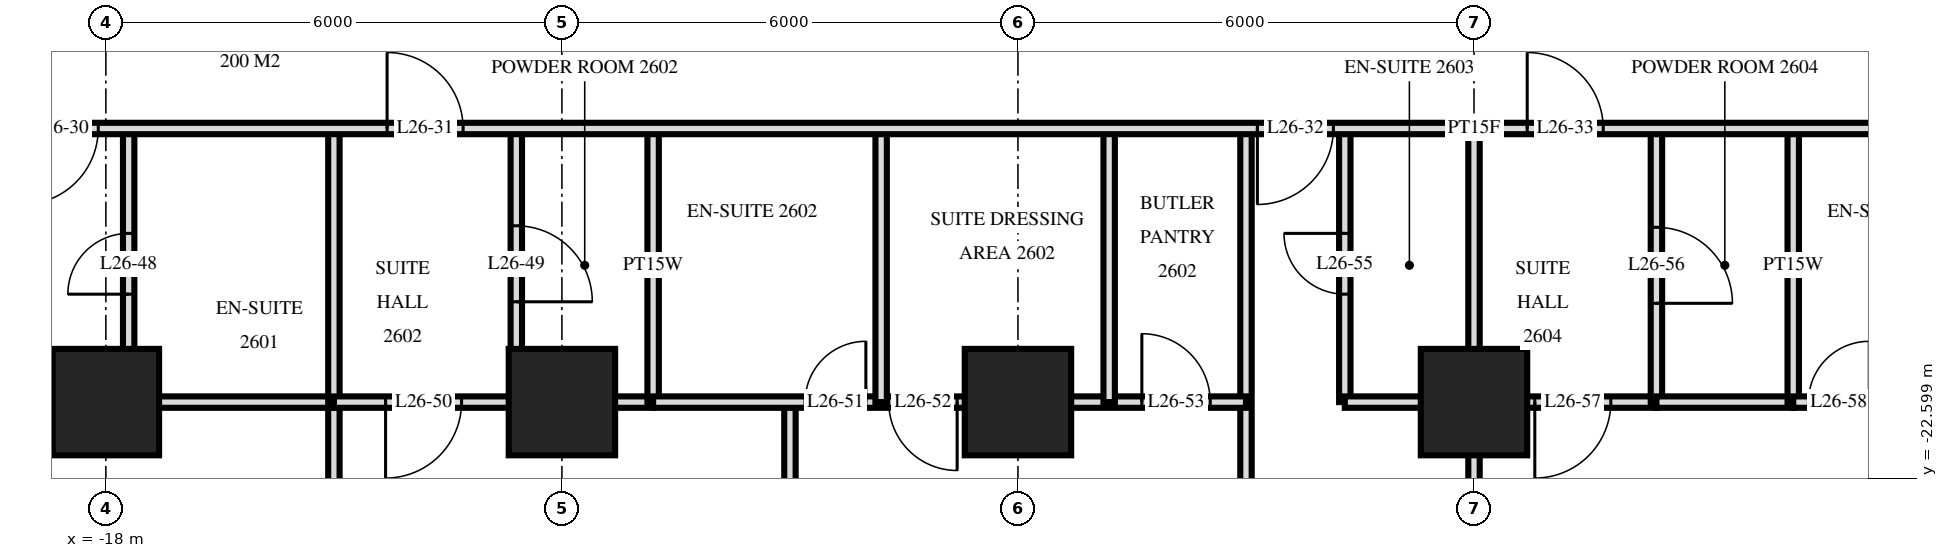
"""IFC4 building model, lengths in metres.
Left out: names, types, materials, properties, quantities, classifications, styles, units other than length and angle.
Written with IfcOpenShell. Run it as: python <this file> out.ifc"""

import sys

from ifc_helpers import new_model, si_unit, direction, frame, frame_2d, origin, origin_2d, place, context, subcontext, project, spatial, rectangle, extrude, element, fill, save


model = new_model("IFC4")
c1 = context("Model", 3, precision=1e-05, world=origin(), true_north=direction((0.0, 1.0)))
c2 = subcontext(c1, "Body", "Model", "MODEL_VIEW")
j1 = project(units=[si_unit("LENGTHUNIT", "METRE"), si_unit("PLANEANGLEUNIT", "RADIAN")], contexts=[c1])
p1 = place(None, origin())
s1 = spatial("IfcSite", under=j1, at=p1, CompositionType="ELEMENT")
p2 = place(p1, origin())
s2 = spatial("IfcBuilding", under=s1, at=p2, CompositionType="ELEMENT")
p3 = place(p2, frame((0.0, 0.0, 103.2)))
s3 = spatial("IfcBuildingStorey", under=s2, at=p3, CompositionType="ELEMENT", Elevation=103.2)
for number, where, z_axis, x_axis in (
    (1, (-18.0, -21.6, 0.0), (0.0, 0.0, 1.0), (1.0, 0.0, 0.0)),
    (2, (-12.0, -21.6, 0.0), (0.0, 0.0, 1.0), (1.0, 0.0, 0.0)),
    (3, (-6.0, -21.6, 0.0), (0.0, 0.0, 1.0), (1.0, 0.0, 0.0)),
    (4, (0.0, -21.6, 0.0), (0.0, 0.0, 1.0), (1.0, 0.0, 0.0)),
):
    element("IfcColumn", number, at=place(p3, frame(where, z_axis=z_axis, x_axis=x_axis)), inside=s3, PredefinedType="COLUMN", context=c2, shape_type="SweptSolid", body=[
        extrude(rectangle(XDim=1.4, YDim=1.4, at=origin_2d()), origin(), (0.0, 0.0, 1.0), 3.6),
    ])
p4 = place(p3, frame((4.2, -21.6, 0.0), z_axis=(0.0, 0.0, 1.0), x_axis=(0.0, 1.0, 0.0)))
e5 = element("IfcWall", 5, at=p4, inside=s3, PredefinedType="PLUMBINGWALL", context=c2, shape_type="SweptSolid", body=[
    extrude(rectangle(XDim=3.6, YDim=0.15, at=frame_2d((1.8, 0.0))), origin(), (0.0, 0.0, 1.0), 3.32),
])
p5 = place(p3, frame((2.4, -21.6, 0.0), z_axis=(0.0, 0.0, 1.0), x_axis=(0.0, 1.0, 0.0)))
e6 = element("IfcWall", 6, at=p5, inside=s3, PredefinedType="PARTITIONING", context=c2, shape_type="SweptSolid", body=[
    extrude(rectangle(XDim=3.6, YDim=0.15, at=frame_2d((1.8, 0.0))), origin(), (0.0, 0.0, 1.0), 3.32),
])
p6 = place(p5, frame((1.3, 0.0, 0.0)))
e7 = element("IfcOpeningElement", 7, at=p6, cuts=e6, PredefinedType="OPENING", context=c2, shape_type="SweptSolid", body=[
    extrude(rectangle(XDim=1.0, YDim=2.1, at=frame_2d((0.5, 1.05))), frame((0.0, 0.085, 0.0), z_axis=(0.0, -1.0, 0.0), x_axis=(1.0, 0.0, 0.0)), (0.0, 0.0, 1.0), 0.17),
])
p7 = place(p3, frame((0.0, -21.6, 0.0), z_axis=(0.0, 0.0, 1.0), x_axis=(0.0, 1.0, 0.0)))
e8 = element("IfcWall", 8, at=p7, inside=s3, PredefinedType="PARTITIONING", context=c2, shape_type="SweptSolid", body=[
    extrude(rectangle(XDim=3.6, YDim=0.15, at=frame_2d((1.8, 0.0))), origin(), (0.0, 0.0, 1.0), 3.32),
])
p8 = place(p3, frame((0.0, -29.22, 0.0), z_axis=(0.0, 0.0, 1.0), x_axis=(0.0, 1.0, 0.0)))
e9 = element("IfcWall", 9, at=p8, inside=s3, PredefinedType="PARTITIONING", context=c2, shape_type="SweptSolid", body=[
    extrude(rectangle(XDim=7.62, YDim=0.15, at=frame_2d((3.81, 0.0))), origin(), (0.0, 0.0, 1.0), 3.32),
])
p9 = place(p3, frame((-1.7, -21.6, 0.0), z_axis=(0.0, 0.0, 1.0), x_axis=(0.0, 1.0, 0.0)))
e10 = element("IfcWall", 10, at=p9, inside=s3, PredefinedType="PARTITIONING", context=c2, shape_type="SweptSolid", body=[
    extrude(rectangle(XDim=3.6, YDim=0.15, at=frame_2d((1.8, 0.0))), origin(), (0.0, 0.0, 1.0), 3.32),
])
p10 = place(p9, frame((1.42, 0.0, 0.0)))
e11 = element("IfcOpeningElement", 11, at=p10, cuts=e10, PredefinedType="OPENING", context=c2, shape_type="SweptSolid", body=[
    extrude(rectangle(XDim=0.8, YDim=2.1, at=frame_2d((0.4, 1.05))), frame((0.0, 0.085, 0.0), z_axis=(0.0, -1.0, 0.0), x_axis=(1.0, 0.0, 0.0)), (0.0, 0.0, 1.0), 0.17),
])
p11 = place(p3, frame((-3.0, -29.22, 0.0), z_axis=(0.0, 0.0, 1.0), x_axis=(0.0, 1.0, 0.0)))
e12 = element("IfcWall", 12, at=p11, inside=s3, PredefinedType="PARTITIONING", context=c2, shape_type="SweptSolid", body=[
    extrude(rectangle(XDim=11.22, YDim=0.15, at=frame_2d((5.61, 0.0))), origin(), (0.0, 0.0, 1.0), 3.32),
])
for number, where, z_axis, x_axis in (
    (13, (-4.8, -21.6, 0.0), (0.0, 0.0, 1.0), (0.0, 1.0, 0.0)),
    (14, (-7.8, -21.6, 0.0), (0.0, 0.0, 1.0), (0.0, 1.0, 0.0)),
):
    element("IfcWall", number, at=place(p3, frame(where, z_axis=z_axis, x_axis=x_axis)), inside=s3, PredefinedType="PARTITIONING", context=c2, shape_type="SweptSolid", body=[
        extrude(rectangle(XDim=3.6, YDim=0.15, at=frame_2d((1.8, 0.0))), origin(), (0.0, 0.0, 1.0), 3.32),
    ])
p12 = place(p3, frame((-9.0, -29.22, 0.0), z_axis=(0.0, 0.0, 1.0), x_axis=(0.0, 1.0, 0.0)))
e15 = element("IfcWall", 15, at=p12, inside=s3, PredefinedType="PARTITIONING", context=c2, shape_type="SweptSolid", body=[
    extrude(rectangle(XDim=7.62, YDim=0.15, at=frame_2d((3.81, 0.0))), origin(), (0.0, 0.0, 1.0), 3.32),
])
p13 = place(p12, frame((3.27, 0.0, 0.0)))
e16 = element("IfcOpeningElement", 16, at=p13, cuts=e15, PredefinedType="OPENING", context=c2, shape_type="SweptSolid", body=[
    extrude(rectangle(XDim=0.9, YDim=2.1, at=frame_2d((0.45, 1.05))), frame((0.0, 0.085, 0.0), z_axis=(0.0, -1.0, 0.0), x_axis=(1.0, 0.0, 0.0)), (0.0, 0.0, 1.0), 0.17),
])
p14 = place(p3, frame((-10.8, -21.6, 0.0), z_axis=(0.0, 0.0, 1.0), x_axis=(0.0, 1.0, 0.0)))
e17 = element("IfcWall", 17, at=p14, inside=s3, PredefinedType="PLUMBINGWALL", context=c2, shape_type="SweptSolid", body=[
    extrude(rectangle(XDim=3.6, YDim=0.15, at=frame_2d((1.8, 0.0))), origin(), (0.0, 0.0, 1.0), 3.32),
])
p15 = place(p3, frame((-12.6, -21.6, 0.0), z_axis=(0.0, 0.0, 1.0), x_axis=(0.0, 1.0, 0.0)))
e18 = element("IfcWall", 18, at=p15, inside=s3, PredefinedType="PARTITIONING", context=c2, shape_type="SweptSolid", body=[
    extrude(rectangle(XDim=3.6, YDim=0.15, at=frame_2d((1.8, 0.0))), origin(), (0.0, 0.0, 1.0), 3.32),
])
p16 = place(p15, frame((1.32, 0.0, 0.0)))
e19 = element("IfcOpeningElement", 19, at=p16, cuts=e18, PredefinedType="OPENING", context=c2, shape_type="SweptSolid", body=[
    extrude(rectangle(XDim=1.0, YDim=2.1, at=frame_2d((0.5, 1.05))), frame((0.0, 0.085, 0.0), z_axis=(0.0, -1.0, 0.0), x_axis=(1.0, 0.0, 0.0)), (0.0, 0.0, 1.0), 0.17),
])
p17 = place(p3, frame((-15.0, -21.6, 0.0), z_axis=(0.0, 0.0, 1.0), x_axis=(0.0, 1.0, 0.0)))
e20 = element("IfcWall", 20, at=p17, inside=s3, PredefinedType="PARTITIONING", context=c2, shape_type="SweptSolid", body=[
    extrude(rectangle(XDim=3.6, YDim=0.15, at=frame_2d((1.8, 0.0))), origin(), (0.0, 0.0, 1.0), 3.32),
])
p18 = place(p3, frame((-15.0, -29.22, 0.0), z_axis=(0.0, 0.0, 1.0), x_axis=(0.0, 1.0, 0.0)))
e21 = element("IfcWall", 21, at=p18, inside=s3, PredefinedType="PARTITIONING", context=c2, shape_type="SweptSolid", body=[
    extrude(rectangle(XDim=7.62, YDim=0.15, at=frame_2d((3.81, 0.0))), origin(), (0.0, 0.0, 1.0), 3.32),
])
p19 = place(p3, frame((-17.7, -21.6, 0.0), z_axis=(0.0, 0.0, 1.0), x_axis=(0.0, 1.0, 0.0)))
e22 = element("IfcWall", 22, at=p19, inside=s3, PredefinedType="PARTITIONING", context=c2, shape_type="SweptSolid", body=[
    extrude(rectangle(XDim=3.6, YDim=0.15, at=frame_2d((1.8, 0.0))), origin(), (0.0, 0.0, 1.0), 3.32),
])
p20 = place(p19, frame((1.42, 0.0, 0.0)))
e23 = element("IfcOpeningElement", 23, at=p20, cuts=e22, PredefinedType="OPENING", context=c2, shape_type="SweptSolid", body=[
    extrude(rectangle(XDim=0.8, YDim=2.1, at=frame_2d((0.4, 1.05))), frame((0.0, 0.085, 0.0), z_axis=(0.0, -1.0, 0.0), x_axis=(1.0, 0.0, 0.0)), (0.0, 0.0, 1.0), 0.17),
])
p21 = place(p3, frame((-15.0, -21.6, 0.0), z_axis=(0.0, 0.0, 1.0), x_axis=(1.0, 0.0, 0.0)))
e24 = element("IfcWall", 24, at=p21, inside=s3, PredefinedType="PARTITIONING", context=c2, shape_type="SweptSolid", body=[
    extrude(rectangle(XDim=2.4, YDim=0.15, at=frame_2d((1.2, 0.0))), origin(), (0.0, 0.0, 1.0), 3.32),
])
p22 = place(p21, frame((0.68, 0.0, 0.0)))
e25 = element("IfcOpeningElement", 25, at=p22, cuts=e24, PredefinedType="OPENING", context=c2, shape_type="SweptSolid", body=[
    extrude(rectangle(XDim=1.0, YDim=2.1, at=frame_2d((0.5, 1.05))), frame((0.0, 0.085, 0.0), z_axis=(0.0, -1.0, 0.0), x_axis=(1.0, 0.0, 0.0)), (0.0, 0.0, 1.0), 0.17),
])
p23 = place(p3, frame((0.0, -21.6, 0.0), z_axis=(0.0, 0.0, 1.0), x_axis=(1.0, 0.0, 0.0)))
e26 = element("IfcWall", 26, at=p23, inside=s3, PredefinedType="PARTITIONING", context=c2, shape_type="SweptSolid", body=[
    extrude(rectangle(XDim=2.4, YDim=0.15, at=frame_2d((1.2, 0.0))), origin(), (0.0, 0.0, 1.0), 3.32),
])
p24 = place(p23, frame((0.8, 0.0, 0.0)))
e27 = element("IfcOpeningElement", 27, at=p24, cuts=e26, PredefinedType="OPENING", context=c2, shape_type="SweptSolid", body=[
    extrude(rectangle(XDim=1.0, YDim=2.1, at=frame_2d((0.5, 1.05))), frame((0.0, 0.085, 0.0), z_axis=(0.0, -1.0, 0.0), x_axis=(1.0, 0.0, 0.0)), (0.0, 0.0, 1.0), 0.17),
])
p25 = place(p3, frame((-17.7, -21.6, 0.0), z_axis=(0.0, 0.0, 1.0), x_axis=(1.0, 0.0, 0.0)))
e28 = element("IfcWall", 28, at=p25, inside=s3, PredefinedType="PARTITIONING", context=c2, shape_type="SweptSolid", body=[
    extrude(rectangle(XDim=2.7, YDim=0.15, at=frame_2d((1.35, 0.0))), origin(), (0.0, 0.0, 1.0), 3.32),
])
p26 = place(p3, frame((-10.8, -21.6, 0.0), z_axis=(0.0, 0.0, 1.0), x_axis=(1.0, 0.0, 0.0)))
e29 = element("IfcWall", 29, at=p26, inside=s3, PredefinedType="PARTITIONING", context=c2, shape_type="SweptSolid", body=[
    extrude(rectangle(XDim=7.8, YDim=0.15, at=frame_2d((3.9, 0.0))), origin(), (0.0, 0.0, 1.0), 3.32),
])
p27 = place(p26, frame((1.999, 0.0, 0.0)))
e30 = element("IfcOpeningElement", 30, at=p27, cuts=e29, PredefinedType="OPENING", context=c2, shape_type="SweptSolid", body=[
    extrude(rectangle(XDim=0.8, YDim=2.1, at=frame_2d((0.4, 1.05))), frame((0.0, 0.085, 0.0), z_axis=(0.0, -1.0, 0.0), x_axis=(1.0, 0.0, 0.0)), (0.0, 0.0, 1.0), 0.17),
])
p28 = place(p26, frame((3.1, 0.0, 0.0)))
e31 = element("IfcOpeningElement", 31, at=p28, cuts=e29, PredefinedType="OPENING", context=c2, shape_type="SweptSolid", body=[
    extrude(rectangle(XDim=0.9, YDim=2.1, at=frame_2d((0.45, 1.05))), frame((0.0, 0.085, 0.0), z_axis=(0.0, -1.0, 0.0), x_axis=(1.0, 0.0, 0.0)), (0.0, 0.0, 1.0), 0.17),
])
p29 = place(p26, frame((6.43, 0.0, 0.0)))
e32 = element("IfcOpeningElement", 32, at=p29, cuts=e29, PredefinedType="OPENING", context=c2, shape_type="SweptSolid", body=[
    extrude(rectangle(XDim=0.9, YDim=2.1, at=frame_2d((0.45, 1.05))), frame((0.0, 0.085, 0.0), z_axis=(0.0, -1.0, 0.0), x_axis=(1.0, 0.0, 0.0)), (0.0, 0.0, 1.0), 0.17),
])
p30 = place(p3, frame((-1.7, -21.6, 0.0), z_axis=(0.0, 0.0, 1.0), x_axis=(1.0, 0.0, 0.0)))
e33 = element("IfcWall", 33, at=p30, inside=s3, PredefinedType="PARTITIONING", context=c2, shape_type="SweptSolid", body=[
    extrude(rectangle(XDim=1.7, YDim=0.15, at=frame_2d((0.85, 0.0))), origin(), (0.0, 0.0, 1.0), 3.32),
])
p31 = place(p3, frame((4.2, -21.6, 0.0), z_axis=(0.0, 0.0, 1.0), x_axis=(1.0, 0.0, 0.0)))
e34 = element("IfcWall", 34, at=p31, inside=s3, PredefinedType="PARTITIONING", context=c2, shape_type="SweptSolid", body=[
    extrude(rectangle(XDim=7.8, YDim=0.15, at=frame_2d((3.9, 0.0))), origin(), (0.0, 0.0, 1.0), 3.32),
])
p32 = place(p31, frame((0.2, 0.0, 0.0)))
e35 = element("IfcOpeningElement", 35, at=p32, cuts=e34, PredefinedType="OPENING", context=c2, shape_type="SweptSolid", body=[
    extrude(rectangle(XDim=0.8, YDim=2.1, at=frame_2d((0.4, 1.05))), frame((0.0, 0.085, 0.0), z_axis=(0.0, -1.0, 0.0), x_axis=(1.0, 0.0, 0.0)), (0.0, 0.0, 1.0), 0.17),
])
p33 = place(p31, frame((4.03, 0.0, 0.0)))
e36 = element("IfcOpeningElement", 36, at=p33, cuts=e34, PredefinedType="OPENING", context=c2, shape_type="SweptSolid", body=[
    extrude(rectangle(XDim=0.9, YDim=2.1, at=frame_2d((0.45, 1.05))), frame((0.0, 0.085, 0.0), z_axis=(0.0, -1.0, 0.0), x_axis=(1.0, 0.0, 0.0)), (0.0, 0.0, 1.0), 0.17),
])
p34 = place(p31, frame((6.1, 0.0, 0.0)))
e37 = element("IfcOpeningElement", 37, at=p34, cuts=e34, PredefinedType="OPENING", context=c2, shape_type="SweptSolid", body=[
    extrude(rectangle(XDim=0.9, YDim=2.1, at=frame_2d((0.45, 1.05))), frame((0.0, 0.085, 0.0), z_axis=(0.0, -1.0, 0.0), x_axis=(1.0, 0.0, 0.0)), (0.0, 0.0, 1.0), 0.17),
])
for number, where, z_axis, x_axis in (
    (38, (-12.6, -21.6, 0.0), (0.0, 0.0, 1.0), (1.0, 0.0, 0.0)),
    (39, (2.4, -21.6, 0.0), (0.0, 0.0, 1.0), (1.0, 0.0, 0.0)),
):
    element("IfcWall", number, at=place(p3, frame(where, z_axis=z_axis, x_axis=x_axis)), inside=s3, PredefinedType="PLUMBINGWALL", context=c2, shape_type="SweptSolid", body=[
        extrude(rectangle(XDim=1.8, YDim=0.15, at=frame_2d((0.9, 0.0))), origin(), (0.0, 0.0, 1.0), 3.32),
    ])
p35 = place(p3, frame((-33.12, -18.0, 0.0), z_axis=(0.0, 0.0, 1.0), x_axis=(1.0, 0.0, 0.0)))
e40 = element("IfcWall", 40, at=p35, inside=s3, PredefinedType="PARTITIONING", context=c2, shape_type="SweptSolid", body=[
    extrude(rectangle(XDim=66.24, YDim=0.15, at=frame_2d((33.12, 0.0))), origin(), (0.0, 0.0, 1.0), 3.32),
])
p36 = place(p35, frame((14.02, 0.0, 0.0)))
e41 = element("IfcOpeningElement", 41, at=p36, cuts=e40, PredefinedType="OPENING", context=c2, shape_type="SweptSolid", body=[
    extrude(rectangle(XDim=1.0, YDim=2.1, at=frame_2d((0.5, 1.05))), frame((0.0, 0.085, 0.0), z_axis=(0.0, -1.0, 0.0), x_axis=(1.0, 0.0, 0.0)), (0.0, 0.0, 1.0), 0.17),
])
p37 = place(p35, frame((18.82, 0.0, 0.0)))
e42 = element("IfcOpeningElement", 42, at=p37, cuts=e40, PredefinedType="OPENING", context=c2, shape_type="SweptSolid", body=[
    extrude(rectangle(XDim=1.0, YDim=2.1, at=frame_2d((0.5, 1.05))), frame((0.0, 0.085, 0.0), z_axis=(0.0, -1.0, 0.0), x_axis=(1.0, 0.0, 0.0)), (0.0, 0.0, 1.0), 0.17),
])
p38 = place(p35, frame((30.27, 0.0, 0.0)))
e43 = element("IfcOpeningElement", 43, at=p38, cuts=e40, PredefinedType="OPENING", context=c2, shape_type="SweptSolid", body=[
    extrude(rectangle(XDim=1.0, YDim=2.1, at=frame_2d((0.5, 1.05))), frame((0.0, 0.085, 0.0), z_axis=(0.0, -1.0, 0.0), x_axis=(1.0, 0.0, 0.0)), (0.0, 0.0, 1.0), 0.17),
])
p39 = place(p35, frame((33.82, 0.0, 0.0)))
e44 = element("IfcOpeningElement", 44, at=p39, cuts=e40, PredefinedType="OPENING", context=c2, shape_type="SweptSolid", body=[
    extrude(rectangle(XDim=1.0, YDim=2.1, at=frame_2d((0.5, 1.05))), frame((0.0, 0.085, 0.0), z_axis=(0.0, -1.0, 0.0), x_axis=(1.0, 0.0, 0.0)), (0.0, 0.0, 1.0), 0.17),
])
p40 = place(p35, frame((46.27, 0.0, 0.0)))
e45 = element("IfcOpeningElement", 45, at=p40, cuts=e40, PredefinedType="OPENING", context=c2, shape_type="SweptSolid", body=[
    extrude(rectangle(XDim=1.0, YDim=2.1, at=frame_2d((0.5, 1.05))), frame((0.0, 0.085, 0.0), z_axis=(0.0, -1.0, 0.0), x_axis=(1.0, 0.0, 0.0)), (0.0, 0.0, 1.0), 0.17),
])
p41 = place(p35, frame((6.07, 0.0, 0.0)))
e46 = element("IfcOpeningElement", 46, at=p41, cuts=e40, PredefinedType="OPENING", context=c2, shape_type="SweptSolid", body=[
    extrude(rectangle(XDim=1.0, YDim=2.1, at=frame_2d((0.5, 1.05))), frame((0.0, 0.085, 0.0), z_axis=(0.0, -1.0, 0.0), x_axis=(1.0, 0.0, 0.0)), (0.0, 0.0, 1.0), 0.17),
])
p42 = place(p35, frame((60.37, 0.0, 0.0)))
e47 = element("IfcOpeningElement", 47, at=p42, cuts=e40, PredefinedType="OPENING", context=c2, shape_type="SweptSolid", body=[
    extrude(rectangle(XDim=1.0, YDim=2.1, at=frame_2d((0.5, 1.05))), frame((0.0, 0.085, 0.0), z_axis=(0.0, -1.0, 0.0), x_axis=(1.0, 0.0, 0.0)), (0.0, 0.0, 1.0), 0.17),
])
p43 = place(p36, frame((0.5, 0.0, 0.0), z_axis=(0.0, 0.0, 1.0), x_axis=(-1.0, 0.0, 0.0)))
e48 = element("IfcDoor", 48, at=p43, inside=s3, OperationType="SINGLE_SWING_LEFT", PredefinedType="DOOR", context=c2, shape_type="SweptSolid", body=[
    extrude(rectangle(XDim=1.0, YDim=2.1, at=frame_2d((0.0, 1.05))), frame((0.0, -0.025, 0.0), z_axis=(0.0, 1.0, 0.0), x_axis=(-1.0, 0.0, 0.0)), (0.0, 0.0, 1.0), 0.05),
])
fill(e41, e48)
p44 = place(p37, origin())
e49 = element("IfcDoor", 49, at=p44, inside=s3, OperationType="SINGLE_SWING_RIGHT", PredefinedType="DOOR", context=c2, shape_type="SweptSolid", body=[
    extrude(rectangle(XDim=1.0, YDim=2.1, at=frame_2d((0.5, 1.05))), frame((0.0, 0.025, 0.0), z_axis=(0.0, -1.0, 0.0), x_axis=(1.0, 0.0, 0.0)), (0.0, 0.0, 1.0), 0.05),
])
fill(e42, e49)
p45 = place(p38, frame((0.5, 0.0, 0.0), z_axis=(0.0, 0.0, 1.0), x_axis=(-1.0, 0.0, 0.0)))
e50 = element("IfcDoor", 50, at=p45, inside=s3, OperationType="SINGLE_SWING_LEFT", PredefinedType="DOOR", context=c2, shape_type="SweptSolid", body=[
    extrude(rectangle(XDim=1.0, YDim=2.1, at=frame_2d((0.0, 1.05))), frame((0.0, -0.025, 0.0), z_axis=(0.0, 1.0, 0.0), x_axis=(-1.0, 0.0, 0.0)), (0.0, 0.0, 1.0), 0.05),
])
fill(e43, e50)
p46 = place(p39, origin())
e51 = element("IfcDoor", 51, at=p46, inside=s3, OperationType="SINGLE_SWING_RIGHT", PredefinedType="DOOR", context=c2, shape_type="SweptSolid", body=[
    extrude(rectangle(XDim=1.0, YDim=2.1, at=frame_2d((0.5, 1.05))), frame((0.0, 0.025, 0.0), z_axis=(0.0, -1.0, 0.0), x_axis=(1.0, 0.0, 0.0)), (0.0, 0.0, 1.0), 0.05),
])
fill(e44, e51)
p47 = place(p20, origin())
e52 = element("IfcDoor", 52, at=p47, inside=s3, OperationType="SINGLE_SWING_RIGHT", PredefinedType="DOOR", context=c2, shape_type="SweptSolid", body=[
    extrude(rectangle(XDim=0.8, YDim=2.1, at=frame_2d((0.4, 1.05))), frame((0.0, 0.025, 0.0), z_axis=(0.0, -1.0, 0.0), x_axis=(1.0, 0.0, 0.0)), (0.0, 0.0, 1.0), 0.05),
])
fill(e23, e52)
p48 = place(p16, frame((0.5, 0.0, 0.0), z_axis=(0.0, 0.0, 1.0), x_axis=(-1.0, 0.0, 0.0)))
e53 = element("IfcDoor", 53, at=p48, inside=s3, OperationType="SINGLE_SWING_LEFT", PredefinedType="DOOR", context=c2, shape_type="SweptSolid", body=[
    extrude(rectangle(XDim=1.0, YDim=2.1, at=frame_2d((0.0, 1.05))), frame((0.0, -0.025, 0.0), z_axis=(0.0, 1.0, 0.0), x_axis=(-1.0, 0.0, 0.0)), (0.0, 0.0, 1.0), 0.05),
])
fill(e19, e53)
p49 = place(p22, frame((0.5, 0.0, 0.0), z_axis=(0.0, 0.0, 1.0), x_axis=(-1.0, 0.0, 0.0)))
e54 = element("IfcDoor", 54, at=p49, inside=s3, OperationType="SINGLE_SWING_LEFT", PredefinedType="DOOR", context=c2, shape_type="SweptSolid", body=[
    extrude(rectangle(XDim=1.0, YDim=2.1, at=frame_2d((0.0, 1.05))), frame((0.0, -0.025, 0.0), z_axis=(0.0, 1.0, 0.0), x_axis=(-1.0, 0.0, 0.0)), (0.0, 0.0, 1.0), 0.05),
])
fill(e25, e54)
p50 = place(p27, origin())
e55 = element("IfcDoor", 55, at=p50, inside=s3, OperationType="SINGLE_SWING_LEFT", PredefinedType="DOOR", context=c2, shape_type="SweptSolid", body=[
    extrude(rectangle(XDim=0.8, YDim=2.1, at=frame_2d((0.4, 1.05))), frame((0.0, 0.025, 0.0), z_axis=(0.0, -1.0, 0.0), x_axis=(1.0, 0.0, 0.0)), (0.0, 0.0, 1.0), 0.05),
])
fill(e30, e55)
p51 = place(p28, frame((0.45, 0.0, 0.0), z_axis=(0.0, 0.0, 1.0), x_axis=(-1.0, 0.0, 0.0)))
e56 = element("IfcDoor", 56, at=p51, inside=s3, OperationType="SINGLE_SWING_RIGHT", PredefinedType="DOOR", context=c2, shape_type="SweptSolid", body=[
    extrude(rectangle(XDim=0.9, YDim=2.1, at=frame_2d((0.0, 1.05))), frame((0.0, -0.025, 0.0), z_axis=(0.0, 1.0, 0.0), x_axis=(-1.0, 0.0, 0.0)), (0.0, 0.0, 1.0), 0.05),
])
fill(e31, e56)
p52 = place(p29, origin())
e57 = element("IfcDoor", 57, at=p52, inside=s3, OperationType="SINGLE_SWING_RIGHT", PredefinedType="DOOR", context=c2, shape_type="SweptSolid", body=[
    extrude(rectangle(XDim=0.9, YDim=2.1, at=frame_2d((0.45, 1.05))), frame((0.0, 0.025, 0.0), z_axis=(0.0, -1.0, 0.0), x_axis=(1.0, 0.0, 0.0)), (0.0, 0.0, 1.0), 0.05),
])
fill(e32, e57)
p53 = place(p10, origin())
e58 = element("IfcDoor", 58, at=p53, inside=s3, OperationType="SINGLE_SWING_LEFT", PredefinedType="DOOR", context=c2, shape_type="SweptSolid", body=[
    extrude(rectangle(XDim=0.8, YDim=2.1, at=frame_2d((0.4, 1.05))), frame((0.0, 0.025, 0.0), z_axis=(0.0, -1.0, 0.0), x_axis=(1.0, 0.0, 0.0)), (0.0, 0.0, 1.0), 0.05),
])
fill(e11, e58)
p54 = place(p6, frame((0.5, 0.0, 0.0), z_axis=(0.0, 0.0, 1.0), x_axis=(-1.0, 0.0, 0.0)))
e59 = element("IfcDoor", 59, at=p54, inside=s3, OperationType="SINGLE_SWING_LEFT", PredefinedType="DOOR", context=c2, shape_type="SweptSolid", body=[
    extrude(rectangle(XDim=1.0, YDim=2.1, at=frame_2d((0.0, 1.05))), frame((0.0, -0.025, 0.0), z_axis=(0.0, 1.0, 0.0), x_axis=(-1.0, 0.0, 0.0)), (0.0, 0.0, 1.0), 0.05),
])
fill(e7, e59)
p55 = place(p24, frame((0.5, 0.0, 0.0), z_axis=(0.0, 0.0, 1.0), x_axis=(-1.0, 0.0, 0.0)))
e60 = element("IfcDoor", 60, at=p55, inside=s3, OperationType="SINGLE_SWING_LEFT", PredefinedType="DOOR", context=c2, shape_type="SweptSolid", body=[
    extrude(rectangle(XDim=1.0, YDim=2.1, at=frame_2d((0.0, 1.05))), frame((0.0, -0.025, 0.0), z_axis=(0.0, 1.0, 0.0), x_axis=(-1.0, 0.0, 0.0)), (0.0, 0.0, 1.0), 0.05),
])
fill(e27, e60)
p56 = place(p32, origin())
e61 = element("IfcDoor", 61, at=p56, inside=s3, OperationType="SINGLE_SWING_LEFT", PredefinedType="DOOR", context=c2, shape_type="SweptSolid", body=[
    extrude(rectangle(XDim=0.8, YDim=2.1, at=frame_2d((0.4, 1.05))), frame((0.0, 0.025, 0.0), z_axis=(0.0, -1.0, 0.0), x_axis=(1.0, 0.0, 0.0)), (0.0, 0.0, 1.0), 0.05),
])
fill(e35, e61)
save(model, sys.argv[1])
